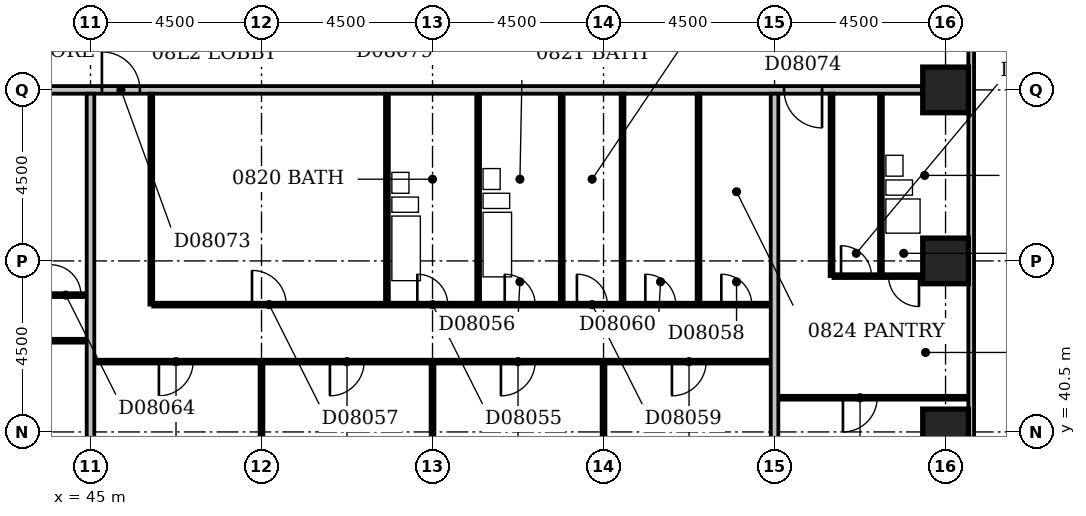
"""IFC4 building model, lengths in metres.
Left out: names, types, materials, properties, quantities, classifications, styles, units other than length and angle.
Written with IfcOpenShell. Run it as: python <this file> out.ifc"""

import sys

from ifc_helpers import new_model, si_unit, direction, frame, frame_2d, origin, origin_2d, place, context, subcontext, project, spatial, rectangle, extrude, element, fill, save


model = new_model("IFC4")
c1 = context("Model", 3, precision=1e-05, world=origin(), true_north=direction((0.0, 1.0)))
c2 = subcontext(c1, "Body", "Model", "MODEL_VIEW")
j1 = project(units=[si_unit("LENGTHUNIT", "METRE"), si_unit("PLANEANGLEUNIT", "RADIAN")], contexts=[c1])
p1 = place(None, origin())
s1 = spatial("IfcSite", under=j1, at=p1, CompositionType="ELEMENT")
p2 = place(p1, origin())
s2 = spatial("IfcBuilding", under=s1, at=p2, CompositionType="ELEMENT")
p3 = place(p2, frame((0.0, 0.0, 39.8)))
s3 = spatial("IfcBuildingStorey", under=s2, at=p3, CompositionType="ELEMENT", Elevation=39.8)
for number, where, z_axis, x_axis in (
    (1, (67.5, 40.5, -0.3), (0.0, 0.0, 1.0), (1.0, 0.0, 0.0)),
    (2, (67.5, 45.0, -0.3), (0.0, 0.0, 1.0), (1.0, 0.0, 0.0)),
    (3, (67.5, 49.5, -0.3), (0.0, 0.0, 1.0), (1.0, 0.0, 0.0)),
):
    element("IfcColumn", number, at=place(p3, frame(where, z_axis=z_axis, x_axis=x_axis)), inside=s3, PredefinedType="COLUMN", context=c2, shape_type="SweptSolid", body=[
        extrude(rectangle(XDim=1.2, YDim=1.2, at=origin_2d()), origin(), (0.0, 0.0, 1.0), 3.6),
    ])
p4 = place(p3, frame((68.175, 35.4, 0.0), z_axis=(0.0, 0.0, 1.0), x_axis=(0.0, 1.0, 0.0)))
e4 = element("IfcWall", 4, at=p4, inside=s3, PredefinedType="STANDARD", context=c2, shape_type="SweptSolid", body=[
    extrude(rectangle(XDim=23.85, YDim=0.15, at=frame_2d((11.925, 0.0))), origin(), (0.0, 0.0, 1.0), 2.7),
])
p5 = place(p4, frame((1.65, 0.0, 0.6)))
e5 = element("IfcOpeningElement", 5, at=p5, cuts=e4, PredefinedType="OPENING", context=c2, shape_type="SweptSolid", body=[
    extrude(rectangle(XDim=2.4, YDim=1.8, at=frame_2d((1.2, 0.9))), frame((0.0, 0.087, 0.0), z_axis=(0.0, -1.0, 0.0), x_axis=(1.0, 0.0, 0.0)), (0.0, 0.0, 1.0), 0.174),
])
p6 = place(p4, frame((20.355, 0.0, 0.6)))
e6 = element("IfcOpeningElement", 6, at=p6, cuts=e4, PredefinedType="OPENING", context=c2, shape_type="SweptSolid", body=[
    extrude(rectangle(XDim=1.8, YDim=1.8, at=frame_2d((0.9, 0.9))), frame((0.0, 0.087, 0.0), z_axis=(0.0, -1.0, 0.0), x_axis=(1.0, 0.0, 0.0)), (0.0, 0.0, 1.0), 0.174),
])
p7 = place(p3, frame((45.0, 36.6, 0.0), z_axis=(0.0, 0.0, 1.0), x_axis=(0.0, 1.0, 0.0)))
e7 = element("IfcWall", 7, at=p7, inside=s3, PredefinedType="PARTITIONING", context=c2, shape_type="SweptSolid", body=[
    extrude(rectangle(XDim=12.8, YDim=0.2, at=frame_2d((6.4, 0.0))), origin(), (0.0, 0.0, 1.0), 2.6),
])
p8 = place(p3, frame((49.5, 36.6, 0.0), z_axis=(0.0, 0.0, 1.0), x_axis=(0.0, 1.0, 0.0)))
e8 = element("IfcWall", 8, at=p8, inside=s3, PredefinedType="PARTITIONING", context=c2, shape_type="SweptSolid", body=[
    extrude(rectangle(XDim=5.7, YDim=0.1, at=frame_2d((2.85, 0.0))), origin(), (0.0, 0.0, 1.0), 3.3),
])
p9 = place(p3, frame((54.0, 36.6, 0.0), z_axis=(0.0, 0.0, 1.0), x_axis=(0.0, 1.0, 0.0)))
e9 = element("IfcWall", 9, at=p9, inside=s3, PredefinedType="PARTITIONING", context=c2, shape_type="SweptSolid", body=[
    extrude(rectangle(XDim=5.7, YDim=0.1, at=frame_2d((2.85, 0.0))), origin(), (0.0, 0.0, 1.0), 2.6),
])
p10 = place(p3, frame((58.5, 36.6, 0.0), z_axis=(0.0, 0.0, 1.0), x_axis=(0.0, 1.0, 0.0)))
e10 = element("IfcWall", 10, at=p10, inside=s3, PredefinedType="PARTITIONING", context=c2, shape_type="SweptSolid", body=[
    extrude(rectangle(XDim=5.7, YDim=0.1, at=frame_2d((2.85, 0.0))), origin(), (0.0, 0.0, 1.0), 3.3),
])
p11 = place(p3, frame((63.0, 36.6, 0.0), z_axis=(0.0, 0.0, 1.0), x_axis=(0.0, 1.0, 0.0)))
e11 = element("IfcWall", 11, at=p11, inside=s3, PredefinedType="PARTITIONING", context=c2, shape_type="SweptSolid", body=[
    extrude(rectangle(XDim=12.8, YDim=0.2, at=frame_2d((6.4, 0.0))), origin(), (0.0, 0.0, 1.0), 2.4),
])
p12 = place(p3, frame((63.1, 41.4, 0.0), z_axis=(0.0, 0.0, 1.0), x_axis=(1.0, 0.0, 0.0)))
e12 = element("IfcWall", 12, at=p12, inside=s3, PredefinedType="PARTITIONING", context=c2, shape_type="SweptSolid", body=[
    extrude(rectangle(XDim=5.0, YDim=0.1, at=frame_2d((2.5, 0.0))), origin(), (0.0, 0.0, 1.0), 3.3),
])
p13 = place(p12, frame((1.7, 0.0, 0.0)))
e13 = element("IfcOpeningElement", 13, at=p13, cuts=e12, PredefinedType="OPENING", context=c2, shape_type="SweptSolid", body=[
    extrude(rectangle(XDim=0.9, YDim=2.1, at=frame_2d((0.45, 1.05))), frame((0.0, 0.062, 0.0), z_axis=(0.0, -1.0, 0.0), x_axis=(1.0, 0.0, 0.0)), (0.0, 0.0, 1.0), 0.124),
])
p14 = place(p3, frame((45.1, 42.35, 0.0), z_axis=(0.0, 0.0, 1.0), x_axis=(1.0, 0.0, 0.0)))
e14 = element("IfcWall", 14, at=p14, inside=s3, PredefinedType="PARTITIONING", context=c2, shape_type="SweptSolid", body=[
    extrude(rectangle(XDim=17.8, YDim=0.1, at=frame_2d((8.9, 0.0))), origin(), (0.0, 0.0, 1.0), 3.3),
])
p15 = place(p14, frame((1.7, 0.0, 0.0)))
e15 = element("IfcOpeningElement", 15, at=p15, cuts=e14, PredefinedType="OPENING", context=c2, shape_type="SweptSolid", body=[
    extrude(rectangle(XDim=0.9, YDim=2.1, at=frame_2d((0.45, 1.05))), frame((0.0, 0.062, 0.0), z_axis=(0.0, -1.0, 0.0), x_axis=(1.0, 0.0, 0.0)), (0.0, 0.0, 1.0), 0.124),
])
p16 = place(p14, frame((6.2, 0.0, 0.0)))
e16 = element("IfcOpeningElement", 16, at=p16, cuts=e14, PredefinedType="OPENING", context=c2, shape_type="SweptSolid", body=[
    extrude(rectangle(XDim=0.9, YDim=2.1, at=frame_2d((0.45, 1.05))), frame((0.0, 0.062, 0.0), z_axis=(0.0, -1.0, 0.0), x_axis=(1.0, 0.0, 0.0)), (0.0, 0.0, 1.0), 0.124),
])
p17 = place(p14, frame((10.7, 0.0, 0.0)))
e17 = element("IfcOpeningElement", 17, at=p17, cuts=e14, PredefinedType="OPENING", context=c2, shape_type="SweptSolid", body=[
    extrude(rectangle(XDim=0.9, YDim=2.1, at=frame_2d((0.45, 1.05))), frame((0.0, 0.062, 0.0), z_axis=(0.0, -1.0, 0.0), x_axis=(1.0, 0.0, 0.0)), (0.0, 0.0, 1.0), 0.124),
])
p18 = place(p14, frame((15.2, 0.0, 0.0)))
e18 = element("IfcOpeningElement", 18, at=p18, cuts=e14, PredefinedType="OPENING", context=c2, shape_type="SweptSolid", body=[
    extrude(rectangle(XDim=0.9, YDim=2.1, at=frame_2d((0.45, 1.05))), frame((0.0, 0.062, 0.0), z_axis=(0.0, -1.0, 0.0), x_axis=(1.0, 0.0, 0.0)), (0.0, 0.0, 1.0), 0.124),
])
p19 = place(p3, frame((40.6, 42.9, 0.0), z_axis=(0.0, 0.0, 1.0), x_axis=(1.0, 0.0, 0.0)))
e19 = element("IfcWall", 19, at=p19, inside=s3, PredefinedType="PARTITIONING", context=c2, shape_type="SweptSolid", body=[
    extrude(rectangle(XDim=4.3, YDim=0.1, at=frame_2d((2.15, 0.0))), origin(), (0.0, 0.0, 1.0), 3.3),
])
p20 = place(p19, frame((1.7, 0.0, 0.0)))
e20 = element("IfcOpeningElement", 20, at=p20, cuts=e19, PredefinedType="OPENING", context=c2, shape_type="SweptSolid", body=[
    extrude(rectangle(XDim=0.9, YDim=2.1, at=frame_2d((0.45, 1.05))), frame((0.0, 0.062, 0.0), z_axis=(0.0, -1.0, 0.0), x_axis=(1.0, 0.0, 0.0)), (0.0, 0.0, 1.0), 0.124),
])
p21 = place(p3, frame((46.6, 43.85, 0.0), z_axis=(0.0, 0.0, 1.0), x_axis=(0.0, 1.0, 0.0)))
e21 = element("IfcWall", 21, at=p21, inside=s3, PredefinedType="PARTITIONING", context=c2, shape_type="SweptSolid", body=[
    extrude(rectangle(XDim=5.55, YDim=0.1, at=frame_2d((2.775, 0.0))), origin(), (0.0, 0.0, 1.0), 3.3),
])
p22 = place(p3, frame((46.65, 43.85, 0.0), z_axis=(0.0, 0.0, 1.0), x_axis=(1.0, 0.0, 0.0)))
e22 = element("IfcWall", 22, at=p22, inside=s3, PredefinedType="PARTITIONING", context=c2, shape_type="SweptSolid", body=[
    extrude(rectangle(XDim=16.25, YDim=0.1, at=frame_2d((8.125, 0.0))), origin(), (0.0, 0.0, 1.0), 3.3),
])
p23 = place(p22, frame((6.95, 0.0, 0.0)))
e23 = element("IfcOpeningElement", 23, at=p23, cuts=e22, PredefinedType="OPENING", context=c2, shape_type="SweptSolid", body=[
    extrude(rectangle(XDim=0.8, YDim=2.1, at=frame_2d((0.4, 1.05))), frame((0.0, 0.062, 0.0), z_axis=(0.0, -1.0, 0.0), x_axis=(1.0, 0.0, 0.0)), (0.0, 0.0, 1.0), 0.124),
])
p24 = place(p22, frame((9.25, 0.0, 0.0)))
e24 = element("IfcOpeningElement", 24, at=p24, cuts=e22, PredefinedType="OPENING", context=c2, shape_type="SweptSolid", body=[
    extrude(rectangle(XDim=0.8, YDim=2.1, at=frame_2d((0.4, 1.05))), frame((0.0, 0.062, 0.0), z_axis=(0.0, -1.0, 0.0), x_axis=(1.0, 0.0, 0.0)), (0.0, 0.0, 1.0), 0.124),
])
p25 = place(p22, frame((2.6, 0.0, 0.0)))
e25 = element("IfcOpeningElement", 25, at=p25, cuts=e22, PredefinedType="OPENING", context=c2, shape_type="SweptSolid", body=[
    extrude(rectangle(XDim=0.9, YDim=2.1, at=frame_2d((0.45, 1.05))), frame((0.0, 0.062, 0.0), z_axis=(0.0, -1.0, 0.0), x_axis=(1.0, 0.0, 0.0)), (0.0, 0.0, 1.0), 0.124),
])
p26 = place(p22, frame((14.95, 0.0, 0.0)))
e26 = element("IfcOpeningElement", 26, at=p26, cuts=e22, PredefinedType="OPENING", context=c2, shape_type="SweptSolid", body=[
    extrude(rectangle(XDim=0.8, YDim=2.1, at=frame_2d((0.4, 1.05))), frame((0.0, 0.062, 0.0), z_axis=(0.0, -1.0, 0.0), x_axis=(1.0, 0.0, 0.0)), (0.0, 0.0, 1.0), 0.124),
])
p27 = place(p22, frame((11.15, 0.0, 0.0)))
e27 = element("IfcOpeningElement", 27, at=p27, cuts=e22, PredefinedType="OPENING", context=c2, shape_type="SweptSolid", body=[
    extrude(rectangle(XDim=0.8, YDim=2.1, at=frame_2d((0.4, 1.05))), frame((0.0, 0.062, 0.0), z_axis=(0.0, -1.0, 0.0), x_axis=(1.0, 0.0, 0.0)), (0.0, 0.0, 1.0), 0.124),
])
p28 = place(p22, frame((12.95, 0.0, 0.0)))
e28 = element("IfcOpeningElement", 28, at=p28, cuts=e22, PredefinedType="OPENING", context=c2, shape_type="SweptSolid", body=[
    extrude(rectangle(XDim=0.8, YDim=2.1, at=frame_2d((0.4, 1.05))), frame((0.0, 0.062, 0.0), z_axis=(0.0, -1.0, 0.0), x_axis=(1.0, 0.0, 0.0)), (0.0, 0.0, 1.0), 0.124),
])
for number, where, z_axis, x_axis in (
    (29, (52.8, 43.9, 0.0), (0.0, 0.0, 1.0), (0.0, 1.0, 0.0)),
    (30, (55.2, 43.9, 0.0), (0.0, 0.0, 1.0), (0.0, 1.0, 0.0)),
    (31, (57.4, 43.9, 0.0), (0.0, 0.0, 1.0), (0.0, 1.0, 0.0)),
):
    element("IfcWall", number, at=place(p3, frame(where, z_axis=z_axis, x_axis=x_axis)), inside=s3, PredefinedType="PLUMBINGWALL", context=c2, shape_type="SweptSolid", body=[
        extrude(rectangle(XDim=5.5, YDim=0.1, at=frame_2d((2.75, 0.0))), origin(), (0.0, 0.0, 1.0), 3.3),
    ])
for number, where, z_axis, x_axis in (
    (32, (59.0, 43.9, 0.0), (0.0, 0.0, 1.0), (0.0, 1.0, 0.0)),
    (33, (61.0, 43.9, 0.0), (0.0, 0.0, 1.0), (0.0, 1.0, 0.0)),
):
    element("IfcWall", number, at=place(p3, frame(where, z_axis=z_axis, x_axis=x_axis)), inside=s3, PredefinedType="PARTITIONING", context=c2, shape_type="SweptSolid", body=[
        extrude(rectangle(XDim=5.5, YDim=0.1, at=frame_2d((2.75, 0.0))), origin(), (0.0, 0.0, 1.0), 3.3),
    ])
p29 = place(p3, frame((43.75, 44.1, 0.0), z_axis=(0.0, 0.0, 1.0), x_axis=(1.0, 0.0, 0.0)))
e34 = element("IfcWall", 34, at=p29, inside=s3, PredefinedType="PARTITIONING", context=c2, shape_type="SweptSolid", body=[
    extrude(rectangle(XDim=1.15, YDim=0.1, at=frame_2d((0.575, 0.0))), origin(), (0.0, 0.0, 1.0), 3.3),
])
p30 = place(p29, frame((0.2, 0.0, 0.0)))
e35 = element("IfcOpeningElement", 35, at=p30, cuts=e34, PredefinedType="OPENING", context=c2, shape_type="SweptSolid", body=[
    extrude(rectangle(XDim=0.8, YDim=2.1, at=frame_2d((0.4, 1.05))), frame((0.0, 0.062, 0.0), z_axis=(0.0, -1.0, 0.0), x_axis=(1.0, 0.0, 0.0)), (0.0, 0.0, 1.0), 0.124),
])
p31 = place(p3, frame((64.5, 44.6, 0.0), z_axis=(0.0, 0.0, 1.0), x_axis=(0.0, 1.0, 0.0)))
e36 = element("IfcWall", 36, at=p31, inside=s3, PredefinedType="PARTITIONING", context=c2, shape_type="SweptSolid", body=[
    extrude(rectangle(XDim=4.8, YDim=0.1, at=frame_2d((2.4, 0.0))), origin(), (0.0, 0.0, 1.0), 3.3),
])
p32 = place(p3, frame((64.55, 44.6, 0.0), z_axis=(0.0, 0.0, 1.0), x_axis=(1.0, 0.0, 0.0)))
e37 = element("IfcWall", 37, at=p32, inside=s3, PredefinedType="PARTITIONING", context=c2, shape_type="SweptSolid", body=[
    extrude(rectangle(XDim=2.35, YDim=0.1, at=frame_2d((1.175, 0.0))), origin(), (0.0, 0.0, 1.0), 3.3),
])
p33 = place(p32, frame((1.45, 0.0, 0.0)))
e38 = element("IfcOpeningElement", 38, at=p33, cuts=e37, PredefinedType="OPENING", context=c2, shape_type="SweptSolid", body=[
    extrude(rectangle(XDim=0.8, YDim=2.1, at=frame_2d((0.4, 1.05))), frame((0.0, 0.062, 0.0), z_axis=(0.0, -1.0, 0.0), x_axis=(1.0, 0.0, 0.0)), (0.0, 0.0, 1.0), 0.124),
])
p34 = place(p32, frame((0.2, 0.0, 0.0)))
e39 = element("IfcOpeningElement", 39, at=p34, cuts=e37, PredefinedType="OPENING", context=c2, shape_type="SweptSolid", body=[
    extrude(rectangle(XDim=0.8, YDim=2.1, at=frame_2d((0.4, 1.05))), frame((0.0, 0.062, 0.0), z_axis=(0.0, -1.0, 0.0), x_axis=(1.0, 0.0, 0.0)), (0.0, 0.0, 1.0), 0.124),
])
p35 = place(p3, frame((65.8, 44.65, 0.0), z_axis=(0.0, 0.0, 1.0), x_axis=(0.0, 1.0, 0.0)))
e40 = element("IfcWall", 40, at=p35, inside=s3, PredefinedType="PLUMBINGWALL", context=c2, shape_type="SweptSolid", body=[
    extrude(rectangle(XDim=4.75, YDim=0.1, at=frame_2d((2.375, 0.0))), origin(), (0.0, 0.0, 1.0), 3.3),
])
p36 = place(p3, frame((9.1, 49.5, 0.0), z_axis=(0.0, 0.0, 1.0), x_axis=(1.0, 0.0, 0.0)))
e41 = element("IfcWall", 41, at=p36, inside=s3, PredefinedType="PARTITIONING", context=c2, shape_type="SweptSolid", body=[
    extrude(rectangle(XDim=57.8, YDim=0.2, at=frame_2d((28.9, 0.0))), origin(), (0.0, 0.0, 1.0), 3.3),
])
p37 = place(p36, frame((14.95, 0.0, 0.0)))
e42 = element("IfcOpeningElement", 42, at=p37, cuts=e41, PredefinedType="OPENING", context=c2, shape_type="SweptSolid", body=[
    extrude(rectangle(XDim=1.0, YDim=2.1, at=frame_2d((0.5, 1.05))), frame((0.0, 0.112, 0.0), z_axis=(0.0, -1.0, 0.0), x_axis=(1.0, 0.0, 0.0)), (0.0, 0.0, 1.0), 0.224),
])
p38 = place(p36, frame((19.85, 0.0, 0.0)))
e43 = element("IfcOpeningElement", 43, at=p38, cuts=e41, PredefinedType="OPENING", context=c2, shape_type="SweptSolid", body=[
    extrude(rectangle(XDim=1.0, YDim=2.1, at=frame_2d((0.5, 1.05))), frame((0.0, 0.112, 0.0), z_axis=(0.0, -1.0, 0.0), x_axis=(1.0, 0.0, 0.0)), (0.0, 0.0, 1.0), 0.224),
])
p39 = place(p36, frame((22.7, 0.0, 0.0)))
e44 = element("IfcOpeningElement", 44, at=p39, cuts=e41, PredefinedType="OPENING", context=c2, shape_type="SweptSolid", body=[
    extrude(rectangle(XDim=1.0, YDim=2.1, at=frame_2d((0.5, 1.05))), frame((0.0, 0.112, 0.0), z_axis=(0.0, -1.0, 0.0), x_axis=(1.0, 0.0, 0.0)), (0.0, 0.0, 1.0), 0.224),
])
p40 = place(p36, frame((33.35, 0.0, 0.0)))
e45 = element("IfcOpeningElement", 45, at=p40, cuts=e41, PredefinedType="OPENING", context=c2, shape_type="SweptSolid", body=[
    extrude(rectangle(XDim=1.0, YDim=2.1, at=frame_2d((0.5, 1.05))), frame((0.0, 0.112, 0.0), z_axis=(0.0, -1.0, 0.0), x_axis=(1.0, 0.0, 0.0)), (0.0, 0.0, 1.0), 0.224),
])
p41 = place(p36, frame((36.2, 0.0, 0.0)))
e46 = element("IfcOpeningElement", 46, at=p41, cuts=e41, PredefinedType="OPENING", context=c2, shape_type="SweptSolid", body=[
    extrude(rectangle(XDim=1.0, YDim=2.1, at=frame_2d((0.5, 1.05))), frame((0.0, 0.112, 0.0), z_axis=(0.0, -1.0, 0.0), x_axis=(1.0, 0.0, 0.0)), (0.0, 0.0, 1.0), 0.224),
])
p42 = place(p36, frame((54.15, 0.0, 0.0)))
e47 = element("IfcOpeningElement", 47, at=p42, cuts=e41, PredefinedType="OPENING", context=c2, shape_type="SweptSolid", body=[
    extrude(rectangle(XDim=1.0, YDim=2.1, at=frame_2d((0.5, 1.05))), frame((0.0, 0.112, 0.0), z_axis=(0.0, -1.0, 0.0), x_axis=(1.0, 0.0, 0.0)), (0.0, 0.0, 1.0), 0.224),
])
p43 = place(p36, frame((6.15, 0.0, 0.0)))
e48 = element("IfcOpeningElement", 48, at=p43, cuts=e41, PredefinedType="OPENING", context=c2, shape_type="SweptSolid", body=[
    extrude(rectangle(XDim=0.9, YDim=2.1, at=frame_2d((0.45, 1.05))), frame((0.0, 0.112, 0.0), z_axis=(0.0, -1.0, 0.0), x_axis=(1.0, 0.0, 0.0)), (0.0, 0.0, 1.0), 0.224),
])
p44 = place(p13, frame((0.9, 0.0, 0.0), z_axis=(0.0, 0.0, 1.0), x_axis=(-1.0, 0.0, 0.0)))
e49 = element("IfcDoor", 49, at=p44, inside=s3, OperationType="SINGLE_SWING_RIGHT", PredefinedType="DOOR", context=c2, shape_type="SweptSolid", body=[
    extrude(rectangle(XDim=0.9, YDim=2.1, at=frame_2d((0.45, 1.05))), frame((0.0, 0.025, 0.0), z_axis=(0.0, -1.0, 0.0), x_axis=(1.0, 0.0, 0.0)), (0.0, 0.0, 1.0), 0.05),
])
fill(e13, e49)
p45 = place(p15, frame((0.9, 0.0, 0.0), z_axis=(0.0, 0.0, 1.0), x_axis=(-1.0, 0.0, 0.0)))
e50 = element("IfcDoor", 50, at=p45, inside=s3, OperationType="SINGLE_SWING_RIGHT", PredefinedType="DOOR", context=c2, shape_type="SweptSolid", body=[
    extrude(rectangle(XDim=0.9, YDim=2.1, at=frame_2d((0.45, 1.05))), frame((0.0, 0.025, 0.0), z_axis=(0.0, -1.0, 0.0), x_axis=(1.0, 0.0, 0.0)), (0.0, 0.0, 1.0), 0.05),
])
fill(e15, e50)
p46 = place(p16, frame((0.9, 0.0, 0.0), z_axis=(0.0, 0.0, 1.0), x_axis=(-1.0, 0.0, 0.0)))
e51 = element("IfcDoor", 51, at=p46, inside=s3, OperationType="SINGLE_SWING_RIGHT", PredefinedType="DOOR", context=c2, shape_type="SweptSolid", body=[
    extrude(rectangle(XDim=0.9, YDim=2.1, at=frame_2d((0.45, 1.05))), frame((0.0, 0.025, 0.0), z_axis=(0.0, -1.0, 0.0), x_axis=(1.0, 0.0, 0.0)), (0.0, 0.0, 1.0), 0.05),
])
fill(e16, e51)
p47 = place(p17, frame((0.9, 0.0, 0.0), z_axis=(0.0, 0.0, 1.0), x_axis=(-1.0, 0.0, 0.0)))
e52 = element("IfcDoor", 52, at=p47, inside=s3, OperationType="SINGLE_SWING_RIGHT", PredefinedType="DOOR", context=c2, shape_type="SweptSolid", body=[
    extrude(rectangle(XDim=0.9, YDim=2.1, at=frame_2d((0.45, 1.05))), frame((0.0, 0.025, 0.0), z_axis=(0.0, -1.0, 0.0), x_axis=(1.0, 0.0, 0.0)), (0.0, 0.0, 1.0), 0.05),
])
fill(e17, e52)
p48 = place(p18, frame((0.9, 0.0, 0.0), z_axis=(0.0, 0.0, 1.0), x_axis=(-1.0, 0.0, 0.0)))
e53 = element("IfcDoor", 53, at=p48, inside=s3, OperationType="SINGLE_SWING_RIGHT", PredefinedType="DOOR", context=c2, shape_type="SweptSolid", body=[
    extrude(rectangle(XDim=0.9, YDim=2.1, at=frame_2d((0.45, 1.05))), frame((0.0, 0.025, 0.0), z_axis=(0.0, -1.0, 0.0), x_axis=(1.0, 0.0, 0.0)), (0.0, 0.0, 1.0), 0.05),
])
fill(e18, e53)
p49 = place(p23, origin())
e54 = element("IfcDoor", 54, at=p49, inside=s3, OperationType="SINGLE_SWING_LEFT", PredefinedType="DOOR", context=c2, shape_type="SweptSolid", body=[
    extrude(rectangle(XDim=0.8, YDim=2.1, at=frame_2d((0.4, 1.05))), frame((0.0, 0.025, 0.0), z_axis=(0.0, -1.0, 0.0), x_axis=(1.0, 0.0, 0.0)), (0.0, 0.0, 1.0), 0.05),
])
fill(e23, e54)
p50 = place(p24, origin())
e55 = element("IfcDoor", 55, at=p50, inside=s3, OperationType="SINGLE_SWING_LEFT", PredefinedType="DOOR", context=c2, shape_type="SweptSolid", body=[
    extrude(rectangle(XDim=0.8, YDim=2.1, at=frame_2d((0.4, 1.05))), frame((0.0, 0.025, 0.0), z_axis=(0.0, -1.0, 0.0), x_axis=(1.0, 0.0, 0.0)), (0.0, 0.0, 1.0), 0.05),
])
fill(e24, e55)
p51 = place(p25, origin())
e56 = element("IfcDoor", 56, at=p51, inside=s3, OperationType="SINGLE_SWING_LEFT", PredefinedType="DOOR", context=c2, shape_type="SweptSolid", body=[
    extrude(rectangle(XDim=0.9, YDim=2.1, at=frame_2d((0.45, 1.05))), frame((0.0, 0.025, 0.0), z_axis=(0.0, -1.0, 0.0), x_axis=(1.0, 0.0, 0.0)), (0.0, 0.0, 1.0), 0.05),
])
fill(e25, e56)
p52 = place(p26, origin())
e57 = element("IfcDoor", 57, at=p52, inside=s3, OperationType="SINGLE_SWING_LEFT", PredefinedType="DOOR", context=c2, shape_type="SweptSolid", body=[
    extrude(rectangle(XDim=0.8, YDim=2.1, at=frame_2d((0.4, 1.05))), frame((0.0, 0.025, 0.0), z_axis=(0.0, -1.0, 0.0), x_axis=(1.0, 0.0, 0.0)), (0.0, 0.0, 1.0), 0.05),
])
fill(e26, e57)
p53 = place(p27, origin())
e58 = element("IfcDoor", 58, at=p53, inside=s3, OperationType="SINGLE_SWING_LEFT", PredefinedType="DOOR", context=c2, shape_type="SweptSolid", body=[
    extrude(rectangle(XDim=0.8, YDim=2.1, at=frame_2d((0.4, 1.05))), frame((0.0, 0.025, 0.0), z_axis=(0.0, -1.0, 0.0), x_axis=(1.0, 0.0, 0.0)), (0.0, 0.0, 1.0), 0.05),
])
fill(e27, e58)
p54 = place(p28, origin())
e59 = element("IfcDoor", 59, at=p54, inside=s3, OperationType="SINGLE_SWING_LEFT", PredefinedType="DOOR", context=c2, shape_type="SweptSolid", body=[
    extrude(rectangle(XDim=0.8, YDim=2.1, at=frame_2d((0.4, 1.05))), frame((0.0, 0.025, 0.0), z_axis=(0.0, -1.0, 0.0), x_axis=(1.0, 0.0, 0.0)), (0.0, 0.0, 1.0), 0.05),
])
fill(e28, e59)
p55 = place(p30, origin())
e60 = element("IfcDoor", 60, at=p55, inside=s3, OperationType="SINGLE_SWING_LEFT", PredefinedType="DOOR", context=c2, shape_type="SweptSolid", body=[
    extrude(rectangle(XDim=0.8, YDim=2.1, at=frame_2d((0.4, 1.05))), frame((0.0, 0.025, 0.0), z_axis=(0.0, -1.0, 0.0), x_axis=(1.0, 0.0, 0.0)), (0.0, 0.0, 1.0), 0.05),
])
fill(e35, e60)
p56 = place(p33, origin())
e61 = element("IfcDoor", 61, at=p56, inside=s3, OperationType="SINGLE_SWING_RIGHT", PredefinedType="DOOR", context=c2, shape_type="SweptSolid", body=[
    extrude(rectangle(XDim=0.8, YDim=2.1, at=frame_2d((0.4, 1.05))), frame((0.0, 0.025, 0.0), z_axis=(0.0, -1.0, 0.0), x_axis=(1.0, 0.0, 0.0)), (0.0, 0.0, 1.0), 0.05),
])
fill(e38, e61)
p57 = place(p34, origin())
e62 = element("IfcDoor", 62, at=p57, inside=s3, OperationType="SINGLE_SWING_LEFT", PredefinedType="DOOR", context=c2, shape_type="SweptSolid", body=[
    extrude(rectangle(XDim=0.8, YDim=2.1, at=frame_2d((0.4, 1.05))), frame((0.0, 0.025, 0.0), z_axis=(0.0, -1.0, 0.0), x_axis=(1.0, 0.0, 0.0)), (0.0, 0.0, 1.0), 0.05),
])
fill(e39, e62)
p58 = place(p41, origin())
e63 = element("IfcDoor", 63, at=p58, inside=s3, OperationType="SINGLE_SWING_LEFT", PredefinedType="DOOR", context=c2, shape_type="SweptSolid", body=[
    extrude(rectangle(XDim=1.0, YDim=2.1, at=frame_2d((0.5, 1.05))), frame((0.0, 0.025, 0.0), z_axis=(0.0, -1.0, 0.0), x_axis=(1.0, 0.0, 0.0)), (0.0, 0.0, 1.0), 0.05),
])
fill(e46, e63)
p59 = place(p42, origin())
e64 = element("IfcDoor", 64, at=p59, inside=s3, OperationType="SINGLE_SWING_RIGHT", PredefinedType="DOOR", context=c2, shape_type="SweptSolid", body=[
    extrude(rectangle(XDim=1.0, YDim=2.1, at=frame_2d((0.5, 1.05))), frame((0.0, 0.025, 0.0), z_axis=(0.0, -1.0, 0.0), x_axis=(1.0, 0.0, 0.0)), (0.0, 0.0, 1.0), 0.05),
])
fill(e47, e64)
save(model, sys.argv[1])
